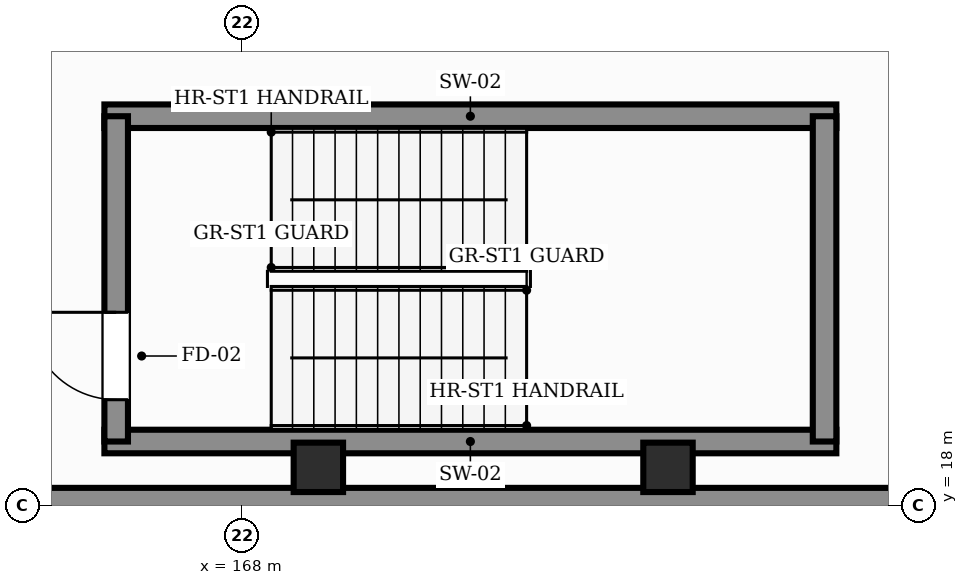
"""IFC4 building model, lengths in metres.
Left out: names, types, materials, properties, quantities, classifications, styles, units other than length and angle.
Written with IfcOpenShell. Run it as: python <this file> out.ifc"""

import sys

from ifc_helpers import new_model, si_unit, direction, frame, frame_2d, origin, origin_2d, place, context, subcontext, project, spatial, rectangle, extrude, element, fill, save


model = new_model("IFC4")
c1 = context("Model", 3, precision=1e-05, world=origin(), true_north=direction((0.0, 1.0)))
c2 = subcontext(c1, "Body", "Model", "MODEL_VIEW")
j1 = project(units=[si_unit("LENGTHUNIT", "METRE"), si_unit("PLANEANGLEUNIT", "RADIAN")], contexts=[c1])
p1 = place(None, origin())
s1 = spatial("IfcSite", under=j1, at=p1, CompositionType="ELEMENT")
p2 = place(p1, origin())
s2 = spatial("IfcBuilding", under=s1, at=p2, CompositionType="ELEMENT")
p3 = place(p2, frame((0.0, 0.0, -4.8)))
s3 = spatial("IfcBuildingStorey", under=s2, at=p3, CompositionType="ELEMENT", Elevation=-4.8)
for number, where, z_axis, x_axis in (
    (1, (169.0, 18.5, 0.0), (0.0, 0.0, 1.0), (1.0, 0.0, 0.0)),
    (2, (173.6, 18.5, 0.0), (0.0, 0.0, 1.0), (1.0, 0.0, 0.0)),
):
    element("IfcColumn", number, at=place(p3, frame(where, z_axis=z_axis, x_axis=x_axis)), inside=s3, PredefinedType="COLUMN", context=c2, shape_type="SweptSolid", body=[
        extrude(rectangle(XDim=0.65, YDim=0.65, at=origin_2d()), origin(), (0.0, 0.0, 1.0), 4.8),
    ])
p4 = place(p3, frame((144.0, 18.0, 0.0), z_axis=(0.0, 0.0, 1.0), x_axis=(1.0, 0.0, 0.0)))
e3 = element("IfcWall", 3, at=p4, inside=s3, PredefinedType="SOLIDWALL", context=c2, shape_type="SweptSolid", body=[
    extrude(rectangle(XDim=36.0, YDim=0.46, at=frame_2d((18.0, 0.0))), origin(), (0.0, 0.0, 1.0), 4.8),
])
for number, where, z_axis, x_axis in (
    (4, (166.185, 18.84, 0.0), (0.0, 0.0, 1.0), (1.0, 0.0, 0.0)),
    (5, (166.185, 23.12, 0.0), (0.0, 0.0, 1.0), (1.0, 0.0, 0.0)),
):
    element("IfcWall", number, at=place(p3, frame(where, z_axis=z_axis, x_axis=x_axis)), inside=s3, PredefinedType="SHEAR", context=c2, shape_type="SweptSolid", body=[
        extrude(rectangle(XDim=9.63, YDim=0.31, at=frame_2d((4.815, 0.0))), origin(), (0.0, 0.0, 1.0), 4.8),
    ])
p5 = place(p3, frame((166.34, 18.84, 0.0), z_axis=(0.0, 0.0, 1.0), x_axis=(0.0, 1.0, 0.0)))
e6 = element("IfcWall", 6, at=p5, inside=s3, PredefinedType="SHEAR", context=c2, shape_type="SweptSolid", body=[
    extrude(rectangle(XDim=4.28, YDim=0.31, at=frame_2d((2.14, 0.0))), origin(), (0.0, 0.0, 1.0), 4.8),
])
p6 = place(p5, frame((0.55, 0.0, 0.0)))
e7 = element("IfcOpeningElement", 7, at=p6, cuts=e6, PredefinedType="OPENING", context=c2, shape_type="SweptSolid", body=[
    extrude(rectangle(XDim=1.15, YDim=2.2, at=frame_2d((0.575, 1.1))), frame((0.0, 0.165, 0.0), z_axis=(0.0, -1.0, 0.0), x_axis=(1.0, 0.0, 0.0)), (0.0, 0.0, 1.0), 0.33),
])
p7 = place(p3, frame((175.66, 18.84, 0.0), z_axis=(0.0, 0.0, 1.0), x_axis=(0.0, 1.0, 0.0)))
e8 = element("IfcWall", 8, at=p7, inside=s3, PredefinedType="SHEAR", context=c2, shape_type="SweptSolid", body=[
    extrude(rectangle(XDim=4.28, YDim=0.31, at=frame_2d((2.14, 0.0))), origin(), (0.0, 0.0, 1.0), 4.8),
])
p8 = place(p6, origin())
e9 = element("IfcDoor", 9, at=p8, inside=s3, OperationType="SINGLE_SWING_RIGHT", PredefinedType="DOOR", context=c2, shape_type="SweptSolid", body=[
    extrude(rectangle(XDim=1.15, YDim=2.2, at=frame_2d((0.575, 1.1))), frame((0.0, 0.025, 0.0), z_axis=(0.0, -1.0, 0.0), x_axis=(1.0, 0.0, 0.0)), (0.0, 0.0, 1.0), 0.05),
])
fill(e7, e9)
save(model, sys.argv[1])
